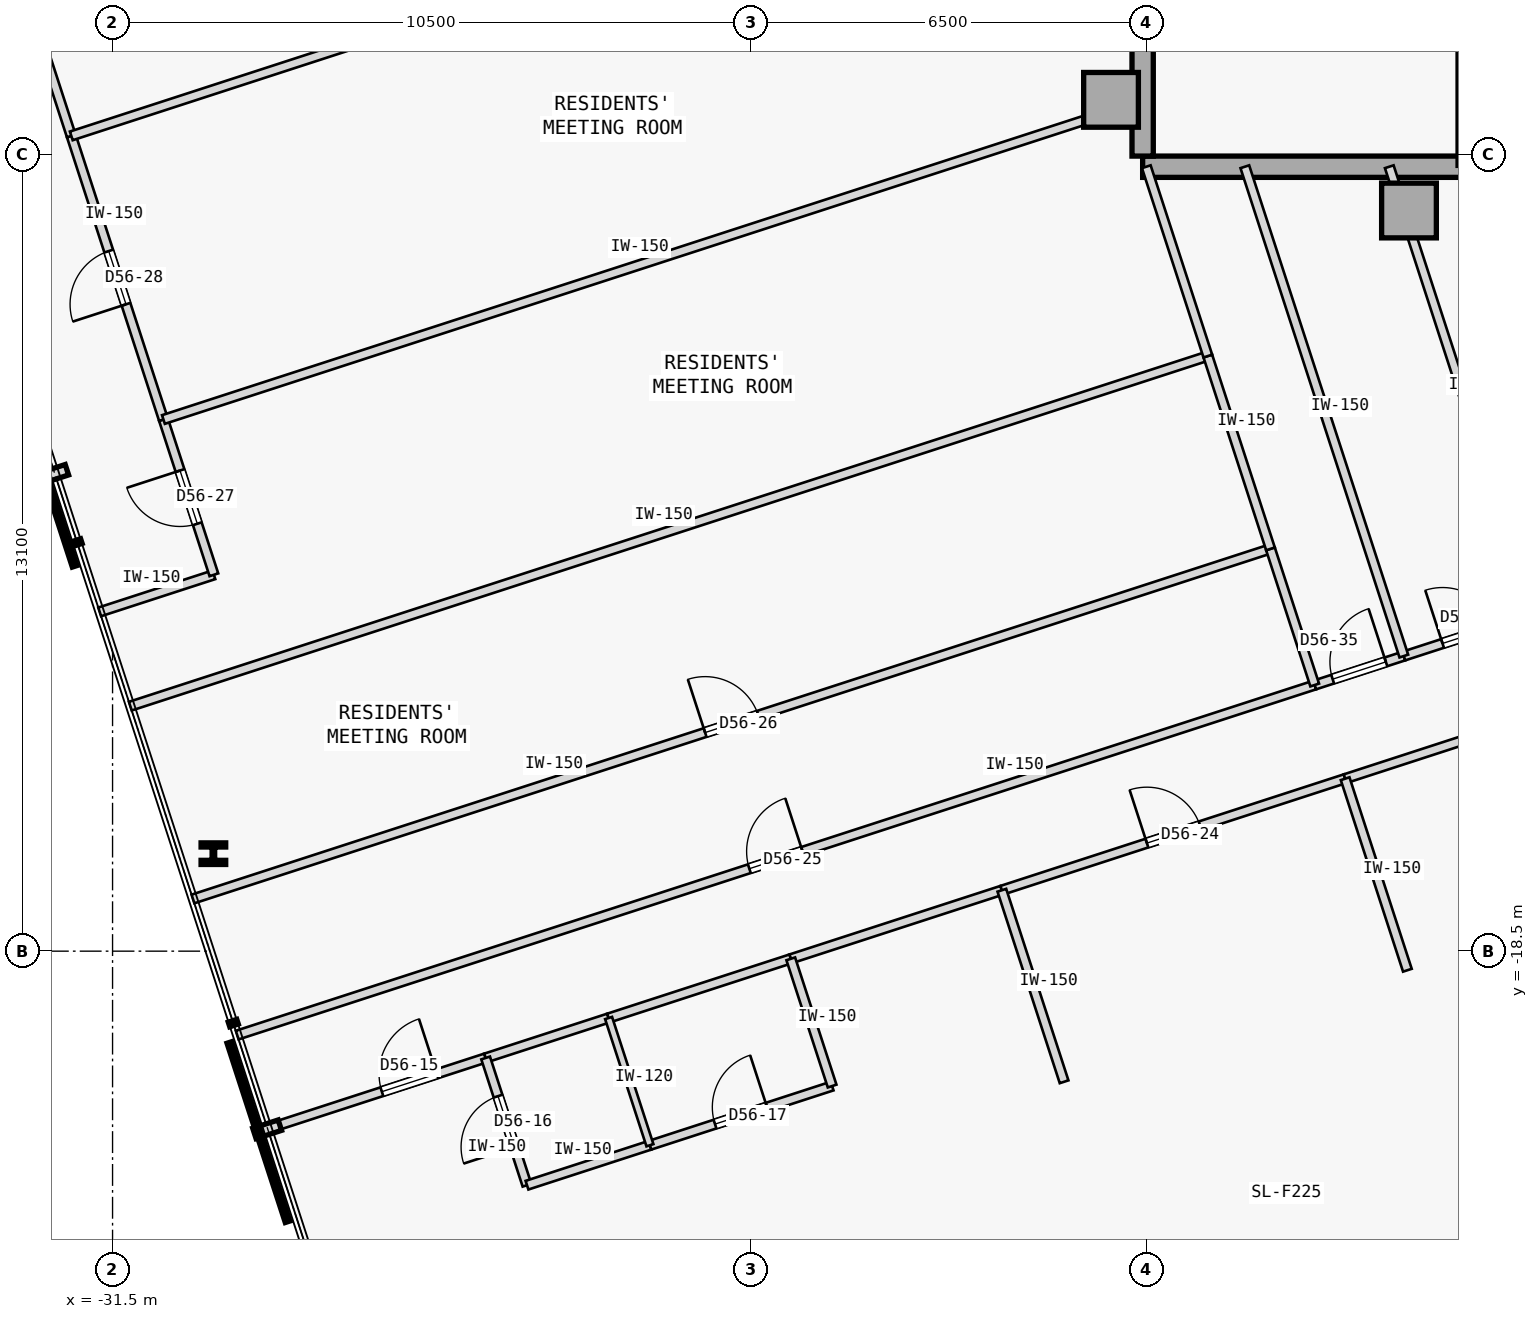
"""IFC4 building model, lengths in metres.
Left out: names, types, materials, properties, quantities, classifications, styles, units other than length and angle.
Written with IfcOpenShell. Run it as: python <this file> out.ifc"""

import sys

from ifc_helpers import new_model, si_unit, direction, frame, frame_2d, origin, origin_2d, place, context, subcontext, project, spatial, rectangle, i_section, extrude, element, fill, save


model = new_model("IFC4")
c1 = context("Model", 3, precision=1e-05, world=origin(), true_north=direction((0.0, 1.0)))
c2 = subcontext(c1, "Body", "Model", "MODEL_VIEW")
j1 = project(units=[si_unit("LENGTHUNIT", "METRE"), si_unit("PLANEANGLEUNIT", "RADIAN")], contexts=[c1])
p1 = place(None, origin())
s1 = spatial("IfcSite", under=j1, at=p1, CompositionType="ELEMENT")
p2 = place(p1, origin())
s2 = spatial("IfcBuilding", under=s1, at=p2, CompositionType="ELEMENT")
p3 = place(p2, frame((0.0, 0.0, 214.25)))
s3 = spatial("IfcBuildingStorey", under=s2, at=p3, CompositionType="ELEMENT", Elevation=214.25)
for number, where, z_axis, x_axis in (
    (1, (-15.08, -4.5, 0.0), (0.0, 0.0, 1.0), (1.0, 0.0, 0.0)),
    (2, (-10.18, -6.32, 0.0), (0.0, 0.0, 1.0), (1.0, 0.0, 0.0)),
):
    element("IfcColumn", number, at=place(p3, frame(where, z_axis=z_axis, x_axis=x_axis)), inside=s3, PredefinedType="COLUMN", context=c2, shape_type="SweptSolid", body=[
        extrude(rectangle(XDim=0.9, YDim=0.9, at=origin_2d()), origin(), (0.0, 0.0, 1.0), 3.35),
    ])
p4 = place(p3, frame((-14.56, -5.6, 0.0), z_axis=(0.0, 0.0, 1.0), x_axis=(1.0, 0.0, 0.0)))
e3 = element("IfcWall", 3, at=p4, inside=s3, PredefinedType="SHEAR", context=c2, shape_type="SweptSolid", body=[
    extrude(rectangle(XDim=10.86, YDim=0.35, at=frame_2d((5.43, 0.0))), origin(), (0.0, 0.0, 1.0), 3.125),
])
p5 = place(p3, frame((-14.56, -5.425, 0.0), z_axis=(0.0, 0.0, 1.0), x_axis=(0.0, 1.0, 0.0)))
e4 = element("IfcWall", 4, at=p5, inside=s3, PredefinedType="SHEAR", context=c2, shape_type="SweptSolid", body=[
    extrude(rectangle(XDim=10.85, YDim=0.35, at=frame_2d((5.425, 0.0))), origin(), (0.0, 0.0, 1.0), 3.125),
])
p6 = place(p3, frame((-29.842, -16.897, 0.0), z_axis=(0.0, 0.0, 1.0), x_axis=(1.0, 0.0, 0.0)))
e5 = element("IfcColumn", 5, at=p6, inside=s3, PredefinedType="COLUMN", context=c2, shape_type="SweptSolid", body=[
    extrude(i_section(OverallWidth=0.405, OverallDepth=0.355, WebThickness=0.042, FlangeThickness=0.068, FilletRadius=0.015, at=origin_2d()), origin(), (0.0, 0.0, 1.0), 3.35),
])
p7 = place(p3, frame((-9.32, -5.6, 0.0), z_axis=(0.0, 0.0, 1.0), x_axis=(0.0, 1.0, 0.0)))
e6 = element("IfcWall", 6, at=p7, inside=s3, PredefinedType="PARTITIONING", context=c2, shape_type="SweptSolid", body=[
    extrude(rectangle(XDim=2.65, YDim=0.15, at=frame_2d((1.325, 0.0))), origin(), (0.0, 0.0, 1.0), 3.125),
])
p8 = place(p3, frame((-28.95, -21.421, 0.0), z_axis=(0.0, 0.0, 1.0), x_axis=(0.951052151329, 0.309030428036, 0.0)))
e7 = element("IfcWall", 7, at=p8, inside=s3, PredefinedType="PARTITIONING", context=c2, shape_type="SweptSolid", body=[
    extrude(rectangle(XDim=3.77, YDim=0.15, at=frame_2d((1.885, 0.0))), origin(), (0.0, 0.0, 1.0), 3.125),
])
p9 = place(p8, frame((1.975, 0.0, 0.0)))
e8 = element("IfcOpeningElement", 8, at=p9, cuts=e7, PredefinedType="OPENING", context=c2, shape_type="SweptSolid", body=[
    extrude(rectangle(XDim=0.95, YDim=2.15, at=frame_2d((0.475, 1.075))), frame((0.0, 0.085, 0.0), z_axis=(0.0, -1.0, 0.0), x_axis=(1.0, 0.0, 0.0)), (0.0, 0.0, 1.0), 0.17),
])
p10 = place(p3, frame((-20.347, -18.626, 0.0), z_axis=(0.0, 0.0, 1.0), x_axis=(0.951057168147, 0.309014988174, 0.0)))
e9 = element("IfcWall", 9, at=p10, inside=s3, PredefinedType="PARTITIONING", context=c2, shape_type="SweptSolid", body=[
    extrude(rectangle(XDim=3.65, YDim=0.15, at=frame_2d((1.825, 0.0))), origin(), (0.0, 0.0, 1.0), 3.125),
])
p11 = place(p3, frame((-25.365, -20.256, 0.0), z_axis=(0.0, 0.0, 1.0), x_axis=(0.951056007502, 0.309018560274, 0.0)))
e10 = element("IfcWall", 10, at=p11, inside=s3, PredefinedType="PARTITIONING", context=c2, shape_type="SweptSolid", body=[
    extrude(rectangle(XDim=2.126, YDim=0.15, at=frame_2d((1.063, 0.0))), origin(), (0.0, 0.0, 1.0), 3.125),
])
p12 = place(p3, frame((-23.343, -19.599, 0.0), z_axis=(0.0, 0.0, 1.0), x_axis=(0.951058557014, 0.309010713619, 0.0)))
e11 = element("IfcWall", 11, at=p12, inside=s3, PredefinedType="PARTITIONING", context=c2, shape_type="SweptSolid", body=[
    extrude(rectangle(XDim=3.15, YDim=0.15, at=frame_2d((1.575, 0.0))), origin(), (0.0, 0.0, 1.0), 3.125),
])
p13 = place(p3, frame((-16.875, -17.498, 0.0), z_axis=(0.0, 0.0, 1.0), x_axis=(0.951057944303, 0.309012599384, 0.0)))
e12 = element("IfcWall", 12, at=p13, inside=s3, PredefinedType="PARTITIONING", context=c2, shape_type="SweptSolid", body=[
    extrude(rectangle(XDim=5.936, YDim=0.15, at=frame_2d((2.968, 0.0))), origin(), (0.0, 0.0, 1.0), 3.125),
])
p14 = place(p13, frame((2.508, 0.0, 0.0)))
e13 = element("IfcOpeningElement", 13, at=p14, cuts=e12, PredefinedType="OPENING", context=c2, shape_type="SweptSolid", body=[
    extrude(rectangle(XDim=0.92, YDim=2.15, at=frame_2d((0.46, 1.075))), frame((0.0, 0.085, 0.0), z_axis=(0.0, -1.0, 0.0), x_axis=(1.0, 0.0, 0.0)), (0.0, 0.0, 1.0), 0.17),
])
p15 = place(p3, frame((-29.45, -19.881, 0.0), z_axis=(0.0, 0.0, 1.0), x_axis=(0.95105650271, 0.309017036186, 0.0)))
e14 = element("IfcWall", 14, at=p15, inside=s3, PredefinedType="PARTITIONING", context=c2, shape_type="SweptSolid", body=[
    extrude(rectangle(XDim=18.632, YDim=0.15, at=frame_2d((9.316, 0.0))), origin(), (0.0, 0.0, 1.0), 3.125),
])
p16 = place(p15, frame((8.856, 0.0, 0.0)))
e15 = element("IfcOpeningElement", 15, at=p16, cuts=e14, PredefinedType="OPENING", context=c2, shape_type="SweptSolid", body=[
    extrude(rectangle(XDim=0.92, YDim=2.15, at=frame_2d((0.46, 1.075))), frame((0.0, 0.085, 0.0), z_axis=(0.0, -1.0, 0.0), x_axis=(1.0, 0.0, 0.0)), (0.0, 0.0, 1.0), 0.17),
])
p17 = place(p3, frame((-31.712, -12.921, 0.0), z_axis=(0.0, 0.0, 1.0), x_axis=(0.951054051148, 0.309024581215, 0.0)))
e16 = element("IfcWall", 16, at=p17, inside=s3, PredefinedType="PARTITIONING", context=c2, shape_type="SweptSolid", body=[
    extrude(rectangle(XDim=1.975, YDim=0.15, at=frame_2d((0.988, 0.0))), origin(), (0.0, 0.0, 1.0), 3.125),
])
p18 = place(p3, frame((-29.833, -12.311, 0.0), z_axis=(0.0, 0.0, 1.0), x_axis=(-0.309044953986, 0.951047431213, 0.0)))
e17 = element("IfcWall", 17, at=p18, inside=s3, PredefinedType="PARTITIONING", context=c2, shape_type="SweptSolid", body=[
    extrude(rectangle(XDim=2.685, YDim=0.15, at=frame_2d((1.343, 0.0))), origin(), (0.0, 0.0, 1.0), 3.125),
])
p19 = place(p18, frame((0.883, 0.0, 0.0)))
e18 = element("IfcOpeningElement", 18, at=p19, cuts=e17, PredefinedType="OPENING", context=c2, shape_type="SweptSolid", body=[
    extrude(rectangle(XDim=0.92, YDim=2.15, at=frame_2d((0.46, 1.075))), frame((0.0, 0.085, 0.0), z_axis=(0.0, -1.0, 0.0), x_axis=(1.0, 0.0, 0.0)), (0.0, 0.0, 1.0), 0.17),
])
p20 = place(p3, frame((-30.663, -9.757, 0.0), z_axis=(0.0, 0.0, 1.0), x_axis=(-0.309019653166, 0.951055652397, 0.0)))
e19 = element("IfcWall", 19, at=p20, inside=s3, PredefinedType="PARTITIONING", context=c2, shape_type="SweptSolid", body=[
    extrude(rectangle(XDim=4.904, YDim=0.15, at=frame_2d((2.452, 0.0))), origin(), (0.0, 0.0, 1.0), 3.125),
])
p21 = place(p20, frame((1.992, 0.0, 0.0)))
e20 = element("IfcOpeningElement", 20, at=p21, cuts=e19, PredefinedType="OPENING", context=c2, shape_type="SweptSolid", body=[
    extrude(rectangle(XDim=0.92, YDim=2.15, at=frame_2d((0.46, 1.075))), frame((0.0, 0.085, 0.0), z_axis=(0.0, -1.0, 0.0), x_axis=(1.0, 0.0, 0.0)), (0.0, 0.0, 1.0), 0.17),
])
p22 = place(p3, frame((-32.179, -5.093, 0.0), z_axis=(0.0, 0.0, 1.0), x_axis=(-0.309014532869, 0.951057316083, 0.0)))
e21 = element("IfcWall", 21, at=p22, inside=s3, PredefinedType="PARTITIONING", context=c2, shape_type="SweptSolid", body=[
    extrude(rectangle(XDim=4.707, YDim=0.15, at=frame_2d((2.354, 0.0))), origin(), (0.0, 0.0, 1.0), 3.125),
])
p23 = place(p3, frame((-11.23, -15.664, 0.0), z_axis=(0.0, 0.0, 1.0), x_axis=(0.951055579382, 0.309019877882, 0.0)))
e22 = element("IfcWall", 22, at=p23, inside=s3, PredefinedType="PARTITIONING", context=c2, shape_type="SweptSolid", body=[
    extrude(rectangle(XDim=5.504, YDim=0.15, at=frame_2d((2.752, 0.0))), origin(), (0.0, 0.0, 1.0), 3.125),
])
p24 = place(p23, frame((2.292, 0.0, 0.0)))
e23 = element("IfcOpeningElement", 23, at=p24, cuts=e22, PredefinedType="OPENING", context=c2, shape_type="SweptSolid", body=[
    extrude(rectangle(XDim=0.92, YDim=2.15, at=frame_2d((0.46, 1.075))), frame((0.0, 0.085, 0.0), z_axis=(0.0, -1.0, 0.0), x_axis=(1.0, 0.0, 0.0)), (0.0, 0.0, 1.0), 0.17),
])
p25 = place(p3, frame((-11.73, -14.123, 0.0), z_axis=(0.0, 0.0, 1.0), x_axis=(0.951032904484, 0.309089654614, 0.0)))
e24 = element("IfcWall", 24, at=p25, inside=s3, PredefinedType="PARTITIONING", context=c2, shape_type="SweptSolid", body=[
    extrude(rectangle(XDim=1.541, YDim=0.15, at=frame_2d((0.771, 0.0))), origin(), (0.0, 0.0, 1.0), 3.125),
])
p26 = place(p25, frame((0.311, 0.0, 0.0)))
e25 = element("IfcOpeningElement", 25, at=p26, cuts=e24, PredefinedType="OPENING", context=c2, shape_type="SweptSolid", body=[
    extrude(rectangle(XDim=0.92, YDim=2.15, at=frame_2d((0.46, 1.075))), frame((0.0, 0.085, 0.0), z_axis=(0.0, -1.0, 0.0), x_axis=(1.0, 0.0, 0.0)), (0.0, 0.0, 1.0), 0.17),
])
p27 = place(p3, frame((-10.265, -13.647, 0.0), z_axis=(0.0, 0.0, 1.0), x_axis=(0.951065832698, 0.308988319964, 0.0)))
e26 = element("IfcWall", 26, at=p27, inside=s3, PredefinedType="PARTITIONING", context=c2, shape_type="SweptSolid", body=[
    extrude(rectangle(XDim=2.259, YDim=0.15, at=frame_2d((1.129, 0.0))), origin(), (0.0, 0.0, 1.0), 3.125),
])
p28 = place(p27, frame((0.669, 0.0, 0.0)))
e27 = element("IfcOpeningElement", 27, at=p28, cuts=e26, PredefinedType="OPENING", context=c2, shape_type="SweptSolid", body=[
    extrude(rectangle(XDim=0.92, YDim=2.15, at=frame_2d((0.46, 1.075))), frame((0.0, 0.085, 0.0), z_axis=(0.0, -1.0, 0.0), x_axis=(1.0, 0.0, 0.0)), (0.0, 0.0, 1.0), 0.17),
])
p29 = place(p3, frame((-24.685, -22.349, 0.0), z_axis=(0.0, 0.0, 1.0), x_axis=(-0.309060979314, 0.951042223598, 0.0)))
e28 = element("IfcWall", 28, at=p29, inside=s3, PredefinedType="PARTITIONING", context=c2, shape_type="SweptSolid", body=[
    extrude(rectangle(XDim=2.2, YDim=0.15, at=frame_2d((1.1, 0.0))), origin(), (0.0, 0.0, 1.0), 3.125),
])
p30 = place(p29, frame((0.66, 0.0, 0.0)))
e29 = element("IfcOpeningElement", 29, at=p30, cuts=e28, PredefinedType="OPENING", context=c2, shape_type="SweptSolid", body=[
    extrude(rectangle(XDim=0.88, YDim=2.15, at=frame_2d((0.44, 1.075))), frame((0.0, 0.085, 0.0), z_axis=(0.0, -1.0, 0.0), x_axis=(1.0, 0.0, 0.0)), (0.0, 0.0, 1.0), 0.17),
])
p31 = place(p3, frame((-24.685, -22.349, 0.0), z_axis=(0.0, 0.0, 1.0), x_axis=(0.951056007502, 0.309018560274, 0.0)))
e30 = element("IfcWall", 30, at=p31, inside=s3, PredefinedType="PARTITIONING", context=c2, shape_type="SweptSolid", body=[
    extrude(rectangle(XDim=2.126, YDim=0.15, at=frame_2d((1.063, 0.0))), origin(), (0.0, 0.0, 1.0), 3.125),
])
p32 = place(p3, frame((-22.663, -21.692, 0.0), z_axis=(0.0, 0.0, 1.0), x_axis=(0.951058557014, 0.309010713619, 0.0)))
e31 = element("IfcWall", 31, at=p32, inside=s3, PredefinedType="PARTITIONING", context=c2, shape_type="SweptSolid", body=[
    extrude(rectangle(XDim=3.15, YDim=0.15, at=frame_2d((1.575, 0.0))), origin(), (0.0, 0.0, 1.0), 3.125),
])
p33 = place(p32, frame((1.125, 0.0, 0.0)))
e32 = element("IfcOpeningElement", 32, at=p33, cuts=e31, PredefinedType="OPENING", context=c2, shape_type="SweptSolid", body=[
    extrude(rectangle(XDim=0.9, YDim=2.15, at=frame_2d((0.45, 1.075))), frame((0.0, 0.085, 0.0), z_axis=(0.0, -1.0, 0.0), x_axis=(1.0, 0.0, 0.0)), (0.0, 0.0, 1.0), 0.17),
])
p34 = place(p3, frame((-19.667, -20.718, 0.0), z_axis=(0.0, 0.0, 1.0), x_axis=(-0.309060979314, 0.951042223598, 0.0)))
e33 = element("IfcWall", 33, at=p34, inside=s3, PredefinedType="PARTITIONING", context=c2, shape_type="SweptSolid", body=[
    extrude(rectangle(XDim=2.2, YDim=0.15, at=frame_2d((1.1, 0.0))), origin(), (0.0, 0.0, 1.0), 3.125),
])
p35 = place(p3, frame((-15.852, -20.648, 0.0), z_axis=(0.0, 0.0, 1.0), x_axis=(-0.309009398695, 0.951058984248, 0.0)))
e34 = element("IfcWall", 34, at=p35, inside=s3, PredefinedType="PARTITIONING", context=c2, shape_type="SweptSolid", body=[
    extrude(rectangle(XDim=3.312, YDim=0.15, at=frame_2d((1.656, 0.0))), origin(), (0.0, 0.0, 1.0), 3.125),
])
p36 = place(p3, frame((-22.663, -21.692, 0.0), z_axis=(0.0, 0.0, 1.0), x_axis=(-0.309060979314, 0.951042223598, 0.0)))
e35 = element("IfcWall", 35, at=p36, inside=s3, PredefinedType="PARTITIONING", context=c2, shape_type="SweptSolid", body=[
    extrude(rectangle(XDim=2.2, YDim=0.12, at=frame_2d((1.1, 0.0))), origin(), (0.0, 0.0, 1.0), 3.125),
])
p37 = place(p3, frame((-10.206, -18.814, 0.0), z_axis=(0.0, 0.0, 1.0), x_axis=(-0.309076071769, 0.951037318857, 0.0)))
e36 = element("IfcWall", 36, at=p37, inside=s3, PredefinedType="PARTITIONING", context=c2, shape_type="SweptSolid", body=[
    extrude(rectangle(XDim=3.312, YDim=0.15, at=frame_2d((1.656, 0.0))), origin(), (0.0, 0.0, 1.0), 3.125),
])
p38 = place(p3, frame((-30.178, -17.642, 0.0), z_axis=(0.0, 0.0, 1.0), x_axis=(0.95105650271, 0.309017036186, 0.0)))
e37 = element("IfcWall", 37, at=p38, inside=s3, PredefinedType="PARTITIONING", context=c2, shape_type="SweptSolid", body=[
    extrude(rectangle(XDim=18.632, YDim=0.15, at=frame_2d((9.316, 0.0))), origin(), (0.0, 0.0, 1.0), 3.125),
])
p39 = place(p38, frame((8.856, 0.0, 0.0)))
e38 = element("IfcOpeningElement", 38, at=p39, cuts=e37, PredefinedType="OPENING", context=c2, shape_type="SweptSolid", body=[
    extrude(rectangle(XDim=0.92, YDim=2.15, at=frame_2d((0.46, 1.075))), frame((0.0, 0.085, 0.0), z_axis=(0.0, -1.0, 0.0), x_axis=(1.0, 0.0, 0.0)), (0.0, 0.0, 1.0), 0.17),
])
p40 = place(p3, frame((-11.73, -14.123, 0.0), z_axis=(0.0, 0.0, 1.0), x_axis=(-0.309062621189, 0.951041690035, 0.0)))
e39 = element("IfcWall", 39, at=p40, inside=s3, PredefinedType="PARTITIONING", context=c2, shape_type="SweptSolid", body=[
    extrude(rectangle(XDim=2.354, YDim=0.15, at=frame_2d((1.177, 0.0))), origin(), (0.0, 0.0, 1.0), 3.125),
])
p41 = place(p3, frame((-31.208, -14.471, 0.0), z_axis=(0.0, 0.0, 1.0), x_axis=(0.951057753948, 0.309013185244, 0.0)))
e40 = element("IfcWall", 40, at=p41, inside=s3, PredefinedType="PARTITIONING", context=c2, shape_type="SweptSolid", body=[
    extrude(rectangle(XDim=18.632, YDim=0.15, at=frame_2d((9.316, 0.0))), origin(), (0.0, 0.0, 1.0), 3.125),
])
p42 = place(p3, frame((-12.458, -11.884, 0.0), z_axis=(0.0, 0.0, 1.0), x_axis=(-0.308946982245, 0.951079261766, 0.0)))
e41 = element("IfcWall", 41, at=p42, inside=s3, PredefinedType="PARTITIONING", context=c2, shape_type="SweptSolid", body=[
    extrude(rectangle(XDim=3.334, YDim=0.15, at=frame_2d((1.667, 0.0))), origin(), (0.0, 0.0, 1.0), 3.125),
])
p43 = place(p3, frame((-30.663, -9.757, 0.0), z_axis=(0.0, 0.0, 1.0), x_axis=(0.951058192995, 0.309011833974, 0.0)))
e42 = element("IfcWall", 42, at=p43, inside=s3, PredefinedType="PARTITIONING", context=c2, shape_type="SweptSolid", body=[
    extrude(rectangle(XDim=16.657, YDim=0.15, at=frame_2d((8.329, 0.0))), origin(), (0.0, 0.0, 1.0), 3.125),
])
p44 = place(p3, frame((-13.488, -8.713, 0.0), z_axis=(0.0, 0.0, 1.0), x_axis=(-0.309082700143, 0.951035164687, 0.0)))
e43 = element("IfcWall", 43, at=p44, inside=s3, PredefinedType="PARTITIONING", context=c2, shape_type="SweptSolid", body=[
    extrude(rectangle(XDim=3.274, YDim=0.15, at=frame_2d((1.637, 0.0))), origin(), (0.0, 0.0, 1.0), 3.125),
])
p45 = place(p3, frame((-32.179, -5.093, 0.0), z_axis=(0.0, 0.0, 1.0), x_axis=(0.951053885426, 0.309025091239, 0.0)))
e44 = element("IfcWall", 44, at=p45, inside=s3, PredefinedType="PARTITIONING", context=c2, shape_type="SweptSolid", body=[
    extrude(rectangle(XDim=16.657, YDim=0.15, at=frame_2d((8.329, 0.0))), origin(), (0.0, 0.0, 1.0), 3.125),
])
p46 = place(p3, frame((-10.265, -13.647, 0.0), z_axis=(0.0, 0.0, 1.0), x_axis=(-0.309007776314, 0.951059511375, 0.0)))
e45 = element("IfcWall", 45, at=p46, inside=s3, PredefinedType="PARTITIONING", context=c2, shape_type="SweptSolid", body=[
    extrude(rectangle(XDim=8.461, YDim=0.15, at=frame_2d((4.23, 0.0))), origin(), (0.0, 0.0, 1.0), 3.125),
])
p47 = place(p3, frame((-8.116, -12.949, 0.0), z_axis=(0.0, 0.0, 1.0), x_axis=(-0.309005340707, 0.951060302722, 0.0)))
e46 = element("IfcWall", 46, at=p47, inside=s3, PredefinedType="PARTITIONING", context=c2, shape_type="SweptSolid", body=[
    extrude(rectangle(XDim=7.727, YDim=0.15, at=frame_2d((3.864, 0.0))), origin(), (0.0, 0.0, 1.0), 3.125),
])
p48 = place(p9, origin())
e47 = element("IfcDoor", 47, at=p48, inside=s3, OperationType="SINGLE_SWING_RIGHT", PredefinedType="DOOR", context=c2, shape_type="SweptSolid", body=[
    extrude(rectangle(XDim=0.95, YDim=2.15, at=frame_2d((0.475, 1.075))), frame((0.0, 0.025, 0.0), z_axis=(0.0, -1.0, 0.0), x_axis=(1.0, 0.0, 0.0)), (0.0, 0.0, 1.0), 0.05),
])
fill(e8, e47)
p49 = place(p30, origin())
e48 = element("IfcDoor", 48, at=p49, inside=s3, OperationType="SINGLE_SWING_LEFT", PredefinedType="DOOR", context=c2, shape_type="SweptSolid", body=[
    extrude(rectangle(XDim=0.88, YDim=2.15, at=frame_2d((0.44, 1.075))), frame((0.0, 0.025, 0.0), z_axis=(0.0, -1.0, 0.0), x_axis=(1.0, 0.0, 0.0)), (0.0, 0.0, 1.0), 0.05),
])
fill(e29, e48)
p50 = place(p33, origin())
e49 = element("IfcDoor", 49, at=p50, inside=s3, OperationType="SINGLE_SWING_RIGHT", PredefinedType="DOOR", context=c2, shape_type="SweptSolid", body=[
    extrude(rectangle(XDim=0.9, YDim=2.15, at=frame_2d((0.45, 1.075))), frame((0.0, 0.025, 0.0), z_axis=(0.0, -1.0, 0.0), x_axis=(1.0, 0.0, 0.0)), (0.0, 0.0, 1.0), 0.05),
])
fill(e32, e49)
p51 = place(p14, origin())
e50 = element("IfcDoor", 50, at=p51, inside=s3, OperationType="SINGLE_SWING_LEFT", PredefinedType="DOOR", context=c2, shape_type="SweptSolid", body=[
    extrude(rectangle(XDim=0.92, YDim=2.15, at=frame_2d((0.46, 1.075))), frame((0.0, 0.025, 0.0), z_axis=(0.0, -1.0, 0.0), x_axis=(1.0, 0.0, 0.0)), (0.0, 0.0, 1.0), 0.05),
])
fill(e13, e50)
p52 = place(p16, origin())
e51 = element("IfcDoor", 51, at=p52, inside=s3, OperationType="SINGLE_SWING_RIGHT", PredefinedType="DOOR", context=c2, shape_type="SweptSolid", body=[
    extrude(rectangle(XDim=0.92, YDim=2.15, at=frame_2d((0.46, 1.075))), frame((0.0, 0.025, 0.0), z_axis=(0.0, -1.0, 0.0), x_axis=(1.0, 0.0, 0.0)), (0.0, 0.0, 1.0), 0.05),
])
fill(e15, e51)
p53 = place(p39, origin())
e52 = element("IfcDoor", 52, at=p53, inside=s3, OperationType="SINGLE_SWING_LEFT", PredefinedType="DOOR", context=c2, shape_type="SweptSolid", body=[
    extrude(rectangle(XDim=0.92, YDim=2.15, at=frame_2d((0.46, 1.075))), frame((0.0, 0.025, 0.0), z_axis=(0.0, -1.0, 0.0), x_axis=(1.0, 0.0, 0.0)), (0.0, 0.0, 1.0), 0.05),
])
fill(e38, e52)
p54 = place(p19, origin())
e53 = element("IfcDoor", 53, at=p54, inside=s3, OperationType="SINGLE_SWING_RIGHT", PredefinedType="DOOR", context=c2, shape_type="SweptSolid", body=[
    extrude(rectangle(XDim=0.92, YDim=2.15, at=frame_2d((0.46, 1.075))), frame((0.0, 0.025, 0.0), z_axis=(0.0, -1.0, 0.0), x_axis=(1.0, 0.0, 0.0)), (0.0, 0.0, 1.0), 0.05),
])
fill(e18, e53)
p55 = place(p21, origin())
e54 = element("IfcDoor", 54, at=p55, inside=s3, OperationType="SINGLE_SWING_LEFT", PredefinedType="DOOR", context=c2, shape_type="SweptSolid", body=[
    extrude(rectangle(XDim=0.92, YDim=2.15, at=frame_2d((0.46, 1.075))), frame((0.0, 0.025, 0.0), z_axis=(0.0, -1.0, 0.0), x_axis=(1.0, 0.0, 0.0)), (0.0, 0.0, 1.0), 0.05),
])
fill(e20, e54)
p56 = place(p26, origin())
e55 = element("IfcDoor", 55, at=p56, inside=s3, OperationType="SINGLE_SWING_RIGHT", PredefinedType="DOOR", context=c2, shape_type="SweptSolid", body=[
    extrude(rectangle(XDim=0.92, YDim=2.15, at=frame_2d((0.46, 1.075))), frame((0.0, 0.025, 0.0), z_axis=(0.0, -1.0, 0.0), x_axis=(1.0, 0.0, 0.0)), (0.0, 0.0, 1.0), 0.05),
])
fill(e25, e55)
p57 = place(p28, origin())
e56 = element("IfcDoor", 56, at=p57, inside=s3, OperationType="SINGLE_SWING_LEFT", PredefinedType="DOOR", context=c2, shape_type="SweptSolid", body=[
    extrude(rectangle(XDim=0.92, YDim=2.15, at=frame_2d((0.46, 1.075))), frame((0.0, 0.025, 0.0), z_axis=(0.0, -1.0, 0.0), x_axis=(1.0, 0.0, 0.0)), (0.0, 0.0, 1.0), 0.05),
])
fill(e27, e56)
save(model, sys.argv[1])
